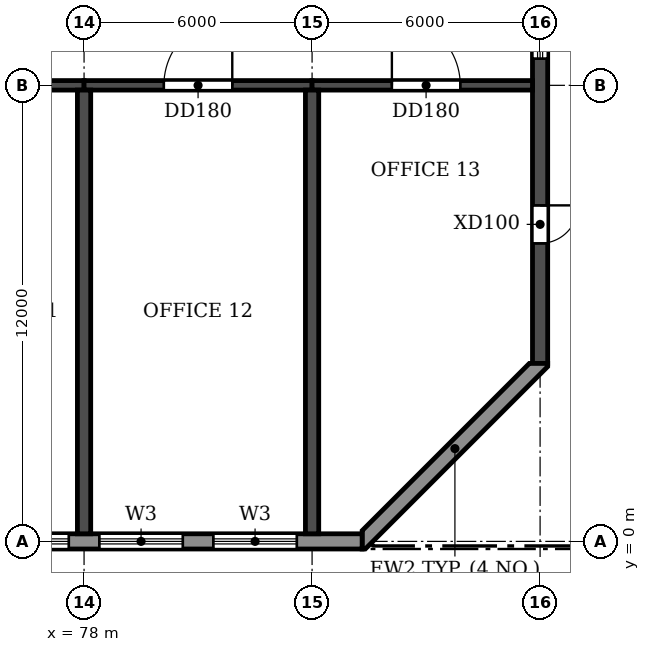
"""IFC4 building model, lengths in metres.
Left out: names, types, materials, properties, quantities, classifications, styles, units other than length and angle.
Written with IfcOpenShell. Run it as: python <this file> out.ifc"""

import sys

from ifc_helpers import new_model, si_unit, direction, frame, frame_2d, origin, place, context, subcontext, project, spatial, polyline, rectangle, outline, extrude, element, fill, save


model = new_model("IFC4")
c1 = context("Model", 3, precision=1e-05, world=origin(), true_north=direction((0.0, 1.0)))
c2 = subcontext(c1, "Body", "Model", "MODEL_VIEW")
j1 = project(units=[si_unit("LENGTHUNIT", "METRE"), si_unit("PLANEANGLEUNIT", "RADIAN")], contexts=[c1])
p1 = place(None, origin())
s1 = spatial("IfcSite", under=j1, at=p1, CompositionType="ELEMENT")
p2 = place(p1, origin())
s2 = spatial("IfcBuilding", under=s1, at=p2, CompositionType="ELEMENT")
p3 = place(p2, frame((0.0, 0.0, 105.9)))
s3 = spatial("IfcBuildingStorey", under=s2, at=p3, CompositionType="ELEMENT", Elevation=105.9)
for number, where, z_axis, x_axis in (
    (1, (78.0, 0.2, 0.0), (0.0, 0.0, 1.0), (0.0, 1.0, 0.0)),
    (2, (84.0, 0.2, 0.0), (0.0, 0.0, 1.0), (0.0, 1.0, 0.0)),
):
    element("IfcWall", number, at=place(p3, frame(where, z_axis=z_axis, x_axis=x_axis)), inside=s3, PredefinedType="SHEAR", context=c2, shape_type="SweptSolid", body=[
        extrude(rectangle(XDim=11.675, YDim=0.35, at=frame_2d((5.837, 0.0))), origin(), (0.0, 0.0, 1.0), 3.06),
    ])
p4 = place(p3, frame((90.0, 4.683, 0.0), z_axis=(0.0, 0.0, 1.0), x_axis=(0.0, 1.0, 0.0)))
e3 = element("IfcWall", 3, at=p4, inside=s3, PredefinedType="SHEAR", context=c2, shape_type="SweptSolid", body=[
    extrude(rectangle(XDim=34.234, YDim=0.4, at=frame_2d((17.117, 0.0))), origin(), (0.0, 0.0, 1.0), 3.06),
])
p5 = place(p4, frame((15.917, 0.0, 0.9)))
e4 = element("IfcOpeningElement", 4, at=p5, cuts=e3, PredefinedType="OPENING", context=c2, shape_type="SweptSolid", body=[
    extrude(rectangle(XDim=1.2, YDim=1.5, at=frame_2d((0.6, 0.75))), frame((0.0, 0.21, 0.0), z_axis=(0.0, -1.0, 0.0), x_axis=(1.0, 0.0, 0.0)), (0.0, 0.0, 1.0), 0.42),
])
p6 = place(p4, frame((23.817, 0.0, 0.9)))
e5 = element("IfcOpeningElement", 5, at=p6, cuts=e3, PredefinedType="OPENING", context=c2, shape_type="SweptSolid", body=[
    extrude(rectangle(XDim=1.2, YDim=1.5, at=frame_2d((0.6, 0.75))), frame((0.0, 0.21, 0.0), z_axis=(0.0, -1.0, 0.0), x_axis=(1.0, 0.0, 0.0)), (0.0, 0.0, 1.0), 0.42),
])
p7 = place(p4, frame((8.017, 0.0, 0.9)))
e6 = element("IfcOpeningElement", 6, at=p7, cuts=e3, PredefinedType="OPENING", context=c2, shape_type="SweptSolid", body=[
    extrude(rectangle(XDim=1.2, YDim=1.5, at=frame_2d((0.6, 0.75))), frame((0.0, 0.21, 0.0), z_axis=(0.0, -1.0, 0.0), x_axis=(1.0, 0.0, 0.0)), (0.0, 0.0, 1.0), 0.42),
])
p8 = place(p4, frame((29.476, 0.0, 0.0)))
e7 = element("IfcOpeningElement", 7, at=p8, cuts=e3, PredefinedType="OPENING", context=c2, shape_type="SweptSolid", body=[
    extrude(rectangle(XDim=1.0, YDim=2.1, at=frame_2d((0.5, 1.05))), frame((0.0, 0.21, 0.0), z_axis=(0.0, -1.0, 0.0), x_axis=(1.0, 0.0, 0.0)), (0.0, 0.0, 1.0), 0.42),
])
p9 = place(p4, frame((3.159, 0.0, 0.0)))
e8 = element("IfcOpeningElement", 8, at=p9, cuts=e3, PredefinedType="OPENING", context=c2, shape_type="SweptSolid", body=[
    extrude(rectangle(XDim=1.0, YDim=2.1, at=frame_2d((0.5, 1.05))), frame((0.0, 0.21, 0.0), z_axis=(0.0, -1.0, 0.0), x_axis=(1.0, 0.0, 0.0)), (0.0, 0.0, 1.0), 0.42),
])
p10 = place(p3, frame((72.0, 12.0, 0.0), z_axis=(0.0, 0.0, 1.0), x_axis=(1.0, 0.0, 0.0)))
e9 = element("IfcWall", 9, at=p10, inside=s3, PredefinedType="SHEAR", context=c2, shape_type="SweptSolid", body=[
    extrude(rectangle(XDim=6.0, YDim=0.25, at=frame_2d((3.0, 0.0))), origin(), (0.0, 0.0, 1.0), 2.46),
])
p11 = place(p10, frame((2.1, 0.0, 0.0)))
e10 = element("IfcOpeningElement", 10, at=p11, cuts=e9, PredefinedType="OPENING", context=c2, shape_type="SweptSolid", body=[
    extrude(rectangle(XDim=1.8, YDim=2.1, at=frame_2d((0.9, 1.05))), frame((0.0, 0.135, 0.0), z_axis=(0.0, -1.0, 0.0), x_axis=(1.0, 0.0, 0.0)), (0.0, 0.0, 1.0), 0.27),
])
p12 = place(p3, frame((78.0, 12.0, 0.0), z_axis=(0.0, 0.0, 1.0), x_axis=(1.0, 0.0, 0.0)))
e11 = element("IfcWall", 11, at=p12, inside=s3, PredefinedType="SHEAR", context=c2, shape_type="SweptSolid", body=[
    extrude(rectangle(XDim=6.0, YDim=0.25, at=frame_2d((3.0, 0.0))), origin(), (0.0, 0.0, 1.0), 2.46),
])
p13 = place(p12, frame((2.1, 0.0, 0.0)))
e12 = element("IfcOpeningElement", 12, at=p13, cuts=e11, PredefinedType="OPENING", context=c2, shape_type="SweptSolid", body=[
    extrude(rectangle(XDim=1.8, YDim=2.1, at=frame_2d((0.9, 1.05))), frame((0.0, 0.135, 0.0), z_axis=(0.0, -1.0, 0.0), x_axis=(1.0, 0.0, 0.0)), (0.0, 0.0, 1.0), 0.27),
])
p14 = place(p3, frame((84.0, 12.0, 0.0), z_axis=(0.0, 0.0, 1.0), x_axis=(1.0, 0.0, 0.0)))
e13 = element("IfcWall", 13, at=p14, inside=s3, PredefinedType="SHEAR", context=c2, shape_type="SweptSolid", body=[
    extrude(rectangle(XDim=5.8, YDim=0.25, at=frame_2d((2.9, 0.0))), origin(), (0.0, 0.0, 1.0), 2.46),
])
p15 = place(p14, frame((2.1, 0.0, 0.0)))
e14 = element("IfcOpeningElement", 14, at=p15, cuts=e13, PredefinedType="OPENING", context=c2, shape_type="SweptSolid", body=[
    extrude(rectangle(XDim=1.8, YDim=2.1, at=frame_2d((0.9, 1.05))), frame((0.0, 0.135, 0.0), z_axis=(0.0, -1.0, 0.0), x_axis=(1.0, 0.0, 0.0)), (0.0, 0.0, 1.0), 0.27),
])
p16 = place(p3, frame((16.683, 0.0, 0.0), z_axis=(0.0, 0.0, 1.0), x_axis=(1.0, 0.0, 0.0)))
e15 = element("IfcWall", 15, at=p16, inside=s3, PredefinedType="STANDARD", context=c2, shape_type="SweptSolid", body=[
    extrude(rectangle(XDim=68.634, YDim=0.4, at=frame_2d((34.317, 0.0))), origin(), (0.0, 0.0, 1.0), 3.06),
])
p17 = place(p16, frame((1.717, 0.0, 0.6)))
e16 = element("IfcOpeningElement", 16, at=p17, cuts=e15, PredefinedType="OPENING", context=c2, shape_type="SweptSolid", body=[
    extrude(rectangle(XDim=2.2, YDim=1.8, at=frame_2d((1.1, 0.9))), frame((0.0, 0.21, 0.0), z_axis=(0.0, -1.0, 0.0), x_axis=(1.0, 0.0, 0.0)), (0.0, 0.0, 1.0), 0.42),
])
p18 = place(p16, frame((4.717, 0.0, 0.6)))
e17 = element("IfcOpeningElement", 17, at=p18, cuts=e15, PredefinedType="OPENING", context=c2, shape_type="SweptSolid", body=[
    extrude(rectangle(XDim=2.2, YDim=1.8, at=frame_2d((1.1, 0.9))), frame((0.0, 0.21, 0.0), z_axis=(0.0, -1.0, 0.0), x_axis=(1.0, 0.0, 0.0)), (0.0, 0.0, 1.0), 0.42),
])
p19 = place(p16, frame((7.717, 0.0, 0.6)))
e18 = element("IfcOpeningElement", 18, at=p19, cuts=e15, PredefinedType="OPENING", context=c2, shape_type="SweptSolid", body=[
    extrude(rectangle(XDim=2.2, YDim=1.8, at=frame_2d((1.1, 0.9))), frame((0.0, 0.21, 0.0), z_axis=(0.0, -1.0, 0.0), x_axis=(1.0, 0.0, 0.0)), (0.0, 0.0, 1.0), 0.42),
])
p20 = place(p16, frame((10.717, 0.0, 0.6)))
e19 = element("IfcOpeningElement", 19, at=p20, cuts=e15, PredefinedType="OPENING", context=c2, shape_type="SweptSolid", body=[
    extrude(rectangle(XDim=2.2, YDim=1.8, at=frame_2d((1.1, 0.9))), frame((0.0, 0.21, 0.0), z_axis=(0.0, -1.0, 0.0), x_axis=(1.0, 0.0, 0.0)), (0.0, 0.0, 1.0), 0.42),
])
p21 = place(p16, frame((19.717, 0.0, 0.6)))
e20 = element("IfcOpeningElement", 20, at=p21, cuts=e15, PredefinedType="OPENING", context=c2, shape_type="SweptSolid", body=[
    extrude(rectangle(XDim=2.2, YDim=1.8, at=frame_2d((1.1, 0.9))), frame((0.0, 0.21, 0.0), z_axis=(0.0, -1.0, 0.0), x_axis=(1.0, 0.0, 0.0)), (0.0, 0.0, 1.0), 0.42),
])
p22 = place(p16, frame((22.717, 0.0, 0.6)))
e21 = element("IfcOpeningElement", 21, at=p22, cuts=e15, PredefinedType="OPENING", context=c2, shape_type="SweptSolid", body=[
    extrude(rectangle(XDim=2.2, YDim=1.8, at=frame_2d((1.1, 0.9))), frame((0.0, 0.21, 0.0), z_axis=(0.0, -1.0, 0.0), x_axis=(1.0, 0.0, 0.0)), (0.0, 0.0, 1.0), 0.42),
])
p23 = place(p16, frame((25.717, 0.0, 0.6)))
e22 = element("IfcOpeningElement", 22, at=p23, cuts=e15, PredefinedType="OPENING", context=c2, shape_type="SweptSolid", body=[
    extrude(rectangle(XDim=2.2, YDim=1.8, at=frame_2d((1.1, 0.9))), frame((0.0, 0.21, 0.0), z_axis=(0.0, -1.0, 0.0), x_axis=(1.0, 0.0, 0.0)), (0.0, 0.0, 1.0), 0.42),
])
p24 = place(p16, frame((28.717, 0.0, 0.6)))
e23 = element("IfcOpeningElement", 23, at=p24, cuts=e15, PredefinedType="OPENING", context=c2, shape_type="SweptSolid", body=[
    extrude(rectangle(XDim=2.2, YDim=1.8, at=frame_2d((1.1, 0.9))), frame((0.0, 0.21, 0.0), z_axis=(0.0, -1.0, 0.0), x_axis=(1.0, 0.0, 0.0)), (0.0, 0.0, 1.0), 0.42),
])
p25 = place(p16, frame((37.717, 0.0, 0.6)))
e24 = element("IfcOpeningElement", 24, at=p25, cuts=e15, PredefinedType="OPENING", context=c2, shape_type="SweptSolid", body=[
    extrude(rectangle(XDim=2.2, YDim=1.8, at=frame_2d((1.1, 0.9))), frame((0.0, 0.21, 0.0), z_axis=(0.0, -1.0, 0.0), x_axis=(1.0, 0.0, 0.0)), (0.0, 0.0, 1.0), 0.42),
])
p26 = place(p16, frame((40.717, 0.0, 0.6)))
e25 = element("IfcOpeningElement", 25, at=p26, cuts=e15, PredefinedType="OPENING", context=c2, shape_type="SweptSolid", body=[
    extrude(rectangle(XDim=2.2, YDim=1.8, at=frame_2d((1.1, 0.9))), frame((0.0, 0.21, 0.0), z_axis=(0.0, -1.0, 0.0), x_axis=(1.0, 0.0, 0.0)), (0.0, 0.0, 1.0), 0.42),
])
p27 = place(p16, frame((43.717, 0.0, 0.6)))
e26 = element("IfcOpeningElement", 26, at=p27, cuts=e15, PredefinedType="OPENING", context=c2, shape_type="SweptSolid", body=[
    extrude(rectangle(XDim=2.2, YDim=1.8, at=frame_2d((1.1, 0.9))), frame((0.0, 0.21, 0.0), z_axis=(0.0, -1.0, 0.0), x_axis=(1.0, 0.0, 0.0)), (0.0, 0.0, 1.0), 0.42),
])
p28 = place(p16, frame((46.717, 0.0, 0.6)))
e27 = element("IfcOpeningElement", 27, at=p28, cuts=e15, PredefinedType="OPENING", context=c2, shape_type="SweptSolid", body=[
    extrude(rectangle(XDim=2.2, YDim=1.8, at=frame_2d((1.1, 0.9))), frame((0.0, 0.21, 0.0), z_axis=(0.0, -1.0, 0.0), x_axis=(1.0, 0.0, 0.0)), (0.0, 0.0, 1.0), 0.42),
])
p29 = place(p16, frame((49.717, 0.0, 0.6)))
e28 = element("IfcOpeningElement", 28, at=p29, cuts=e15, PredefinedType="OPENING", context=c2, shape_type="SweptSolid", body=[
    extrude(rectangle(XDim=2.2, YDim=1.8, at=frame_2d((1.1, 0.9))), frame((0.0, 0.21, 0.0), z_axis=(0.0, -1.0, 0.0), x_axis=(1.0, 0.0, 0.0)), (0.0, 0.0, 1.0), 0.42),
])
p30 = place(p16, frame((52.717, 0.0, 0.6)))
e29 = element("IfcOpeningElement", 29, at=p30, cuts=e15, PredefinedType="OPENING", context=c2, shape_type="SweptSolid", body=[
    extrude(rectangle(XDim=2.2, YDim=1.8, at=frame_2d((1.1, 0.9))), frame((0.0, 0.21, 0.0), z_axis=(0.0, -1.0, 0.0), x_axis=(1.0, 0.0, 0.0)), (0.0, 0.0, 1.0), 0.42),
])
p31 = place(p16, frame((55.717, 0.0, 0.6)))
e30 = element("IfcOpeningElement", 30, at=p31, cuts=e15, PredefinedType="OPENING", context=c2, shape_type="SweptSolid", body=[
    extrude(rectangle(XDim=2.2, YDim=1.8, at=frame_2d((1.1, 0.9))), frame((0.0, 0.21, 0.0), z_axis=(0.0, -1.0, 0.0), x_axis=(1.0, 0.0, 0.0)), (0.0, 0.0, 1.0), 0.42),
])
p32 = place(p16, frame((58.717, 0.0, 0.6)))
e31 = element("IfcOpeningElement", 31, at=p32, cuts=e15, PredefinedType="OPENING", context=c2, shape_type="SweptSolid", body=[
    extrude(rectangle(XDim=2.2, YDim=1.8, at=frame_2d((1.1, 0.9))), frame((0.0, 0.21, 0.0), z_axis=(0.0, -1.0, 0.0), x_axis=(1.0, 0.0, 0.0)), (0.0, 0.0, 1.0), 0.42),
])
p33 = place(p16, frame((61.717, 0.0, 0.6)))
e32 = element("IfcOpeningElement", 32, at=p33, cuts=e15, PredefinedType="OPENING", context=c2, shape_type="SweptSolid", body=[
    extrude(rectangle(XDim=2.2, YDim=1.8, at=frame_2d((1.1, 0.9))), frame((0.0, 0.21, 0.0), z_axis=(0.0, -1.0, 0.0), x_axis=(1.0, 0.0, 0.0)), (0.0, 0.0, 1.0), 0.42),
])
p34 = place(p16, frame((64.717, 0.0, 0.6)))
e33 = element("IfcOpeningElement", 33, at=p34, cuts=e15, PredefinedType="OPENING", context=c2, shape_type="SweptSolid", body=[
    extrude(rectangle(XDim=2.2, YDim=1.8, at=frame_2d((1.1, 0.9))), frame((0.0, 0.21, 0.0), z_axis=(0.0, -1.0, 0.0), x_axis=(1.0, 0.0, 0.0)), (0.0, 0.0, 1.0), 0.42),
])
p35 = place(p3, origin())
e34 = element("IfcWall", 34, at=p35, inside=s3, PredefinedType="STANDARD", context=c2, shape_type="SweptSolid", body=[
    extrude(outline(polyline([(85.317, -0.2), (85.4, -0.2), (90.2, 4.6), (90.2, 4.683), (89.717, 4.683), (85.317, 0.283), (85.317, -0.2)])), origin(), (0.0, 0.0, 1.0), 3.06),
])
p36 = place(p32, origin())
e35 = element("IfcWindow", 35, at=p36, inside=s3, PartitioningType="DOUBLE_PANEL_HORIZONTAL", PredefinedType="WINDOW", context=c2, shape_type="SweptSolid", body=[
    extrude(rectangle(XDim=2.2, YDim=1.8, at=frame_2d((1.1, 0.9))), frame((0.0, 0.03, 0.0), z_axis=(0.0, -1.0, 0.0), x_axis=(1.0, 0.0, 0.0)), (0.0, 0.0, 1.0), 0.06),
])
fill(e31, e35)
p37 = place(p33, origin())
e36 = element("IfcWindow", 36, at=p37, inside=s3, PartitioningType="DOUBLE_PANEL_HORIZONTAL", PredefinedType="WINDOW", context=c2, shape_type="SweptSolid", body=[
    extrude(rectangle(XDim=2.2, YDim=1.8, at=frame_2d((1.1, 0.9))), frame((0.0, 0.03, 0.0), z_axis=(0.0, -1.0, 0.0), x_axis=(1.0, 0.0, 0.0)), (0.0, 0.0, 1.0), 0.06),
])
fill(e32, e36)
p38 = place(p34, origin())
e37 = element("IfcWindow", 37, at=p38, inside=s3, PartitioningType="DOUBLE_PANEL_HORIZONTAL", PredefinedType="WINDOW", context=c2, shape_type="SweptSolid", body=[
    extrude(rectangle(XDim=2.2, YDim=1.8, at=frame_2d((1.1, 0.9))), frame((0.0, 0.03, 0.0), z_axis=(0.0, -1.0, 0.0), x_axis=(1.0, 0.0, 0.0)), (0.0, 0.0, 1.0), 0.06),
])
fill(e33, e37)
p39 = place(p7, origin())
e38 = element("IfcWindow", 38, at=p39, inside=s3, PartitioningType="SINGLE_PANEL", PredefinedType="WINDOW", context=c2, shape_type="SweptSolid", body=[
    extrude(rectangle(XDim=1.2, YDim=1.5, at=frame_2d((0.6, 0.75))), frame((0.0, 0.03, 0.0), z_axis=(0.0, -1.0, 0.0), x_axis=(1.0, 0.0, 0.0)), (0.0, 0.0, 1.0), 0.06),
])
fill(e6, e38)
p40 = place(p13, origin())
e39 = element("IfcDoor", 39, at=p40, inside=s3, OperationType="DOUBLE_DOOR_SINGLE_SWING", PredefinedType="DOOR", context=c2, shape_type="SweptSolid", body=[
    extrude(rectangle(XDim=1.8, YDim=2.1, at=frame_2d((0.9, 1.05))), frame((0.0, 0.025, 0.0), z_axis=(0.0, -1.0, 0.0), x_axis=(1.0, 0.0, 0.0)), (0.0, 0.0, 1.0), 0.05),
])
fill(e12, e39)
p41 = place(p15, origin())
e40 = element("IfcDoor", 40, at=p41, inside=s3, OperationType="DOUBLE_DOOR_SINGLE_SWING", PredefinedType="DOOR", context=c2, shape_type="SweptSolid", body=[
    extrude(rectangle(XDim=1.8, YDim=2.1, at=frame_2d((0.9, 1.05))), frame((0.0, 0.025, 0.0), z_axis=(0.0, -1.0, 0.0), x_axis=(1.0, 0.0, 0.0)), (0.0, 0.0, 1.0), 0.05),
])
fill(e14, e40)
p42 = place(p9, frame((1.0, 0.0, 0.0), z_axis=(0.0, 0.0, 1.0), x_axis=(-1.0, 0.0, 0.0)))
e41 = element("IfcDoor", 41, at=p42, inside=s3, OperationType="SINGLE_SWING_LEFT", PredefinedType="DOOR", context=c2, shape_type="SweptSolid", body=[
    extrude(rectangle(XDim=1.0, YDim=2.1, at=frame_2d((0.5, 1.05))), frame((0.0, 0.025, 0.0), z_axis=(0.0, -1.0, 0.0), x_axis=(1.0, 0.0, 0.0)), (0.0, 0.0, 1.0), 0.05),
])
fill(e8, e41)
save(model, sys.argv[1])
